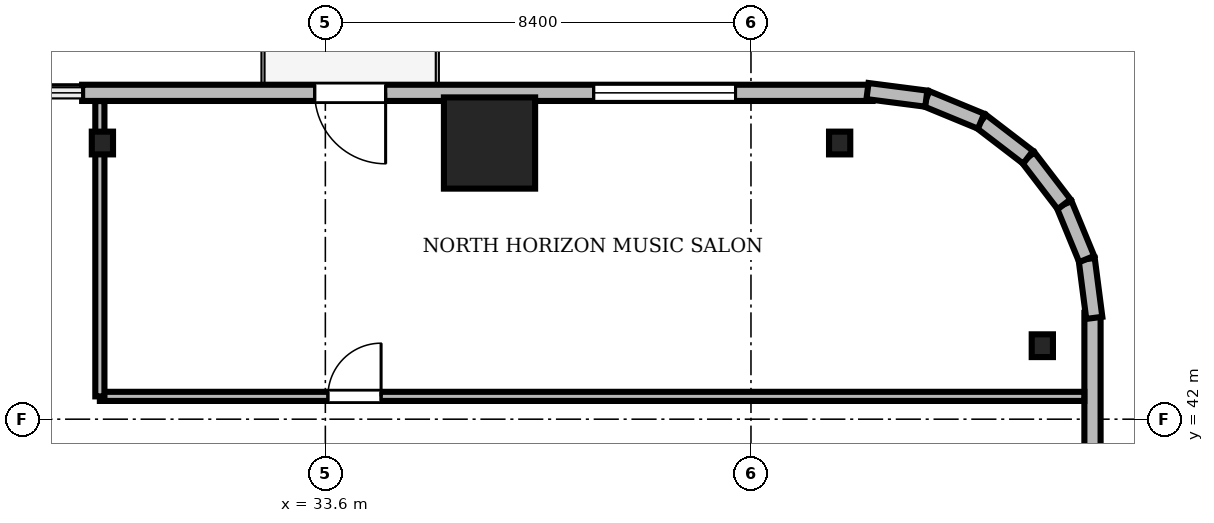
"""IFC4 building model, lengths in metres.
Left out: names, types, materials, properties, quantities, classifications, styles, units other than length and angle.
Written with IfcOpenShell. Run it as: python <this file> out.ifc"""

import sys

from ifc_helpers import new_model, si_unit, direction, frame, frame_2d, origin, origin_2d, place, context, subcontext, project, spatial, rectangle, i_section, extrude, source, transform, mapped, element, fill, save


model = new_model("IFC4")
c1 = context("Model", 3, precision=1e-05, world=origin(), true_north=direction((0.0, 1.0)))
c2 = subcontext(c1, "Body", "Model", "MODEL_VIEW")
j1 = project(units=[si_unit("LENGTHUNIT", "METRE"), si_unit("PLANEANGLEUNIT", "RADIAN")], contexts=[c1])
p1 = place(None, origin())
s1 = spatial("IfcSite", under=j1, at=p1, CompositionType="ELEMENT")
p2 = place(p1, origin())
s2 = spatial("IfcBuilding", under=s1, at=p2, CompositionType="ELEMENT")
p3 = place(p2, frame((0.0, 0.0, 64.1)))
s3 = spatial("IfcBuildingStorey", under=s2, at=p3, CompositionType="ELEMENT", Elevation=64.1)
m1 = source(origin(), c2, "Body", "SweptSolid", [
    extrude(rectangle(XDim=1.8, YDim=1.8, at=origin_2d()), origin(), (0.0, 0.0, 1.0), 3.41),
])
p4 = place(p3, frame((36.84, 47.45, 0.0), z_axis=(0.0, 0.0, 1.0), x_axis=(1.0, 0.0, 0.0)))
e1 = element("IfcColumn", 1, at=p4, inside=s3, PredefinedType="COLUMN", context=c2, shape_type="MappedRepresentation", body=[
    mapped(m1, transform((0.0, 0.0, 0.0), scale=1.0)),
])
m2 = source(origin(), c2, "Body", "SweptSolid", [
    extrude(i_section(OverallWidth=0.419, OverallDepth=0.449, WebThickness=0.031, FlangeThickness=0.048, FilletRadius=0.015, at=origin_2d()), origin(), (0.0, 0.0, 1.0), 3.41),
])
for number, where, z_axis, x_axis in (
    (2, (47.75, 43.45, 0.0), (0.0, 0.0, 1.0), (1.0, 0.0, 0.0)),
    (3, (43.75, 47.45, 0.0), (0.0, 0.0, 1.0), (1.0, 0.0, 0.0)),
    (4, (29.2, 47.45, 0.0), (0.0, 0.0, 1.0), (1.0, 0.0, 0.0)),
):
    element("IfcColumn", number, at=place(p3, frame(where, z_axis=z_axis, x_axis=x_axis)), inside=s3, PredefinedType="COLUMN", context=c2, shape_type="MappedRepresentation", body=[
        mapped(m2, transform((0.0, 0.0, 0.0), scale=1.0)),
    ])
m3 = source(origin(), c2, "Body", "SweptSolid", [
    extrude(rectangle(XDim=15.6, YDim=0.32, at=frame_2d((7.8, 0.0))), origin(), (0.0, 0.0, 1.0), 3.41),
])
p5 = place(p3, frame((44.4, 48.44, 0.0), z_axis=(0.0, 0.0, 1.0), x_axis=(-1.0, 0.0, 0.0)))
e5 = element("IfcWall", 5, at=p5, inside=s3, PredefinedType="SOLIDWALL", context=c2, shape_type="MappedRepresentation", body=[
    mapped(m3, transform((0.0, 0.0, 0.0), scale=1.0)),
])
m4 = source(origin(), c2, "Body", "SweptSolid", [
    extrude(rectangle(XDim=1.4, YDim=2.3, at=frame_2d((0.7, 1.15))), frame((0.0, 0.17, 0.0), z_axis=(0.0, -1.0, 0.0), x_axis=(1.0, 0.0, 0.0)), (0.0, 0.0, 1.0), 0.34),
])
p6 = place(p5, frame((9.61, 0.0, 0.0)))
e6 = element("IfcOpeningElement", 6, at=p6, cuts=e5, PredefinedType="OPENING", context=c2, shape_type="MappedRepresentation", body=[
    mapped(m4, transform((0.0, 0.0, 0.0), scale=1.0)),
])
m5 = source(origin(), c2, "Body", "SweptSolid", [
    extrude(rectangle(XDim=2.8, YDim=2.4, at=frame_2d((1.4, 1.2))), frame((0.0, 0.17, 0.0), z_axis=(0.0, -1.0, 0.0), x_axis=(1.0, 0.0, 0.0)), (0.0, 0.0, 1.0), 0.34),
])
p7 = place(p5, frame((2.705, 0.0, 0.72)))
e7 = element("IfcOpeningElement", 7, at=p7, cuts=e5, PredefinedType="OPENING", context=c2, shape_type="MappedRepresentation", body=[
    mapped(m5, transform((0.0, 0.0, 0.0), scale=1.0)),
])
m6 = source(origin(), c2, "Body", "SweptSolid", [
    extrude(rectangle(XDim=15.6, YDim=0.32, at=frame_2d((7.8, 0.0))), origin(), (0.0, 0.0, 1.0), 3.41),
])
p8 = place(p3, frame((48.74, 28.5, 0.0), z_axis=(0.0, 0.0, 1.0), x_axis=(0.0, 1.0, 0.0)))
e8 = element("IfcWall", 8, at=p8, inside=s3, PredefinedType="SOLIDWALL", context=c2, shape_type="MappedRepresentation", body=[
    mapped(m6, transform((0.0, 0.0, 0.0), scale=1.0)),
])
p9 = place(p8, frame((10.095, 0.0, 0.72)))
e9 = element("IfcOpeningElement", 9, at=p9, cuts=e8, PredefinedType="OPENING", context=c2, shape_type="MappedRepresentation", body=[
    mapped(m5, transform((0.0, 0.0, 0.0), scale=1.0)),
])
m7 = source(origin(), c2, "Body", "SweptSolid", [
    extrude(rectangle(XDim=1.17, YDim=0.32, at=frame_2d((0.585, 0.0))), origin(), (0.0, 0.0, 1.0), 3.41),
])
p10 = place(p3, frame((48.776, 44.0, 0.0), z_axis=(0.0, 0.0, 1.0), x_axis=(-0.128295670475, 0.991735963317, 0.0)))
e10 = element("IfcWall", 10, at=p10, inside=s3, PredefinedType="SOLIDWALL", context=c2, shape_type="MappedRepresentation", body=[
    mapped(m7, transform((0.0, 0.0, 0.0), scale=1.0)),
])
m8 = source(origin(), c2, "Body", "SweptSolid", [
    extrude(rectangle(XDim=1.169, YDim=0.32, at=frame_2d((0.584, 0.0))), origin(), (0.0, 0.0, 1.0), 3.41),
])
p11 = place(p3, frame((48.625, 45.16, 0.0), z_axis=(0.0, 0.0, 1.0), x_axis=(-0.381054331552, 0.924552646638, 0.0)))
e11 = element("IfcWall", 11, at=p11, inside=s3, PredefinedType="SOLIDWALL", context=c2, shape_type="MappedRepresentation", body=[
    mapped(m8, transform((0.0, 0.0, 0.0), scale=1.0)),
])
m9 = source(origin(), c2, "Body", "SweptSolid", [
    extrude(rectangle(XDim=1.169, YDim=0.32, at=frame_2d((0.584, 0.0))), origin(), (0.0, 0.0, 1.0), 3.41),
])
p12 = place(p3, frame((48.18, 46.241, 0.0), z_axis=(0.0, 0.0, 1.0), x_axis=(-0.608387696831, 0.793639975269, 0.0)))
e12 = element("IfcWall", 12, at=p12, inside=s3, PredefinedType="SOLIDWALL", context=c2, shape_type="MappedRepresentation", body=[
    mapped(m9, transform((0.0, 0.0, 0.0), scale=1.0)),
])
m10 = source(origin(), c2, "Body", "SweptSolid", [
    extrude(rectangle(XDim=1.169, YDim=0.32, at=frame_2d((0.584, 0.0))), origin(), (0.0, 0.0, 1.0), 3.41),
])
p13 = place(p3, frame((47.469, 47.169, 0.0), z_axis=(0.0, 0.0, 1.0), x_axis=(-0.793663520347, 0.608356981114, 0.0)))
e13 = element("IfcWall", 13, at=p13, inside=s3, PredefinedType="SOLIDWALL", context=c2, shape_type="MappedRepresentation", body=[
    mapped(m10, transform((0.0, 0.0, 0.0), scale=1.0)),
])
p14 = place(p3, frame((46.541, 47.88, 0.0), z_axis=(0.0, 0.0, 1.0), x_axis=(-0.924552646638, 0.381054331552, 0.0)))
e14 = element("IfcWall", 14, at=p14, inside=s3, PredefinedType="SOLIDWALL", context=c2, shape_type="MappedRepresentation", body=[
    mapped(m8, transform((0.0, 0.0, 0.0), scale=1.0)),
])
p15 = place(p3, frame((45.46, 48.325, 0.0), z_axis=(0.0, 0.0, 1.0), x_axis=(-0.991735963317, 0.128295670475, 0.0)))
e15 = element("IfcWall", 15, at=p15, inside=s3, PredefinedType="SOLIDWALL", context=c2, shape_type="MappedRepresentation", body=[
    mapped(m7, transform((0.0, 0.0, 0.0), scale=1.0)),
])
m11 = source(origin(), c2, "Body", "SweptSolid", [
    extrude(rectangle(XDim=19.428, YDim=0.18, at=frame_2d((9.714, 0.0))), origin(), (0.0, 0.0, 1.0), 2.652),
])
p16 = place(p3, frame((29.15, 42.45, 0.0), z_axis=(0.0, 0.0, 1.0), x_axis=(1.0, 0.0, 0.0)))
e16 = element("IfcWall", 16, at=p16, inside=s3, PredefinedType="PARTITIONING", context=c2, shape_type="MappedRepresentation", body=[
    mapped(m11, transform((0.0, 0.0, 0.0), scale=1.0)),
])
m12 = source(origin(), c2, "Body", "SweptSolid", [
    extrude(rectangle(XDim=1.05, YDim=2.2, at=frame_2d((0.525, 1.1))), frame((0.0, 0.1, 0.0), z_axis=(0.0, -1.0, 0.0), x_axis=(1.0, 0.0, 0.0)), (0.0, 0.0, 1.0), 0.2),
])
p17 = place(p16, frame((4.5, 0.0, 0.0)))
e17 = element("IfcOpeningElement", 17, at=p17, cuts=e16, PredefinedType="OPENING", context=c2, shape_type="MappedRepresentation", body=[
    mapped(m12, transform((0.0, 0.0, 0.0), scale=1.0)),
])
m13 = source(origin(), c2, "Body", "SweptSolid", [
    extrude(rectangle(XDim=5.828, YDim=0.18, at=frame_2d((2.914, 0.0))), origin(), (0.0, 0.0, 1.0), 2.652),
])
p18 = place(p3, frame((29.15, 42.45, 0.0), z_axis=(0.0, 0.0, 1.0), x_axis=(0.0, 1.0, 0.0)))
e18 = element("IfcWall", 18, at=p18, inside=s3, PredefinedType="PARTITIONING", context=c2, shape_type="MappedRepresentation", body=[
    mapped(m13, transform((0.0, 0.0, 0.0), scale=1.0)),
])
m14 = source(origin(), c2, "Body", "SweptSolid", [
    extrude(rectangle(XDim=1.4, YDim=2.3, at=frame_2d((0.7, 1.15))), frame((0.0, 0.025, 0.0), z_axis=(0.0, -1.0, 0.0), x_axis=(1.0, 0.0, 0.0)), (0.0, 0.0, 1.0), 0.05),
])
p19 = place(p6, frame((1.4, 0.0, 0.0), z_axis=(0.0, 0.0, 1.0), x_axis=(-1.0, 0.0, 0.0)))
e19 = element("IfcDoor", 19, at=p19, inside=s3, OperationType="DOUBLE_DOOR_SLIDING", PredefinedType="DOOR", context=c2, shape_type="MappedRepresentation", body=[
    mapped(m14, transform((0.0, 0.0, 0.0), scale=1.0)),
])
fill(e6, e19)
m15 = source(origin(), c2, "Body", "SweptSolid", [
    extrude(rectangle(XDim=2.8, YDim=2.4, at=frame_2d((1.4, 1.2))), frame((0.0, 0.03, 0.0), z_axis=(0.0, -1.0, 0.0), x_axis=(1.0, 0.0, 0.0)), (0.0, 0.0, 1.0), 0.06),
])
p20 = place(p7, origin())
e20 = element("IfcWindow", 20, at=p20, inside=s3, PartitioningType="SINGLE_PANEL", PredefinedType="WINDOW", context=c2, shape_type="MappedRepresentation", body=[
    mapped(m15, transform((0.0, 0.0, 0.0), scale=1.0)),
])
fill(e7, e20)
m16 = source(origin(), c2, "Body", "SweptSolid", [
    extrude(rectangle(XDim=1.05, YDim=2.2, at=frame_2d((0.525, 1.1))), frame((0.0, 0.025, 0.0), z_axis=(0.0, -1.0, 0.0), x_axis=(1.0, 0.0, 0.0)), (0.0, 0.0, 1.0), 0.05),
])
p21 = place(p17, origin())
e21 = element("IfcDoor", 21, at=p21, inside=s3, OperationType="SINGLE_SWING_RIGHT", PredefinedType="DOOR", context=c2, shape_type="MappedRepresentation", body=[
    mapped(m16, transform((0.0, 0.0, 0.0), scale=1.0)),
])
fill(e17, e21)
save(model, sys.argv[1])
